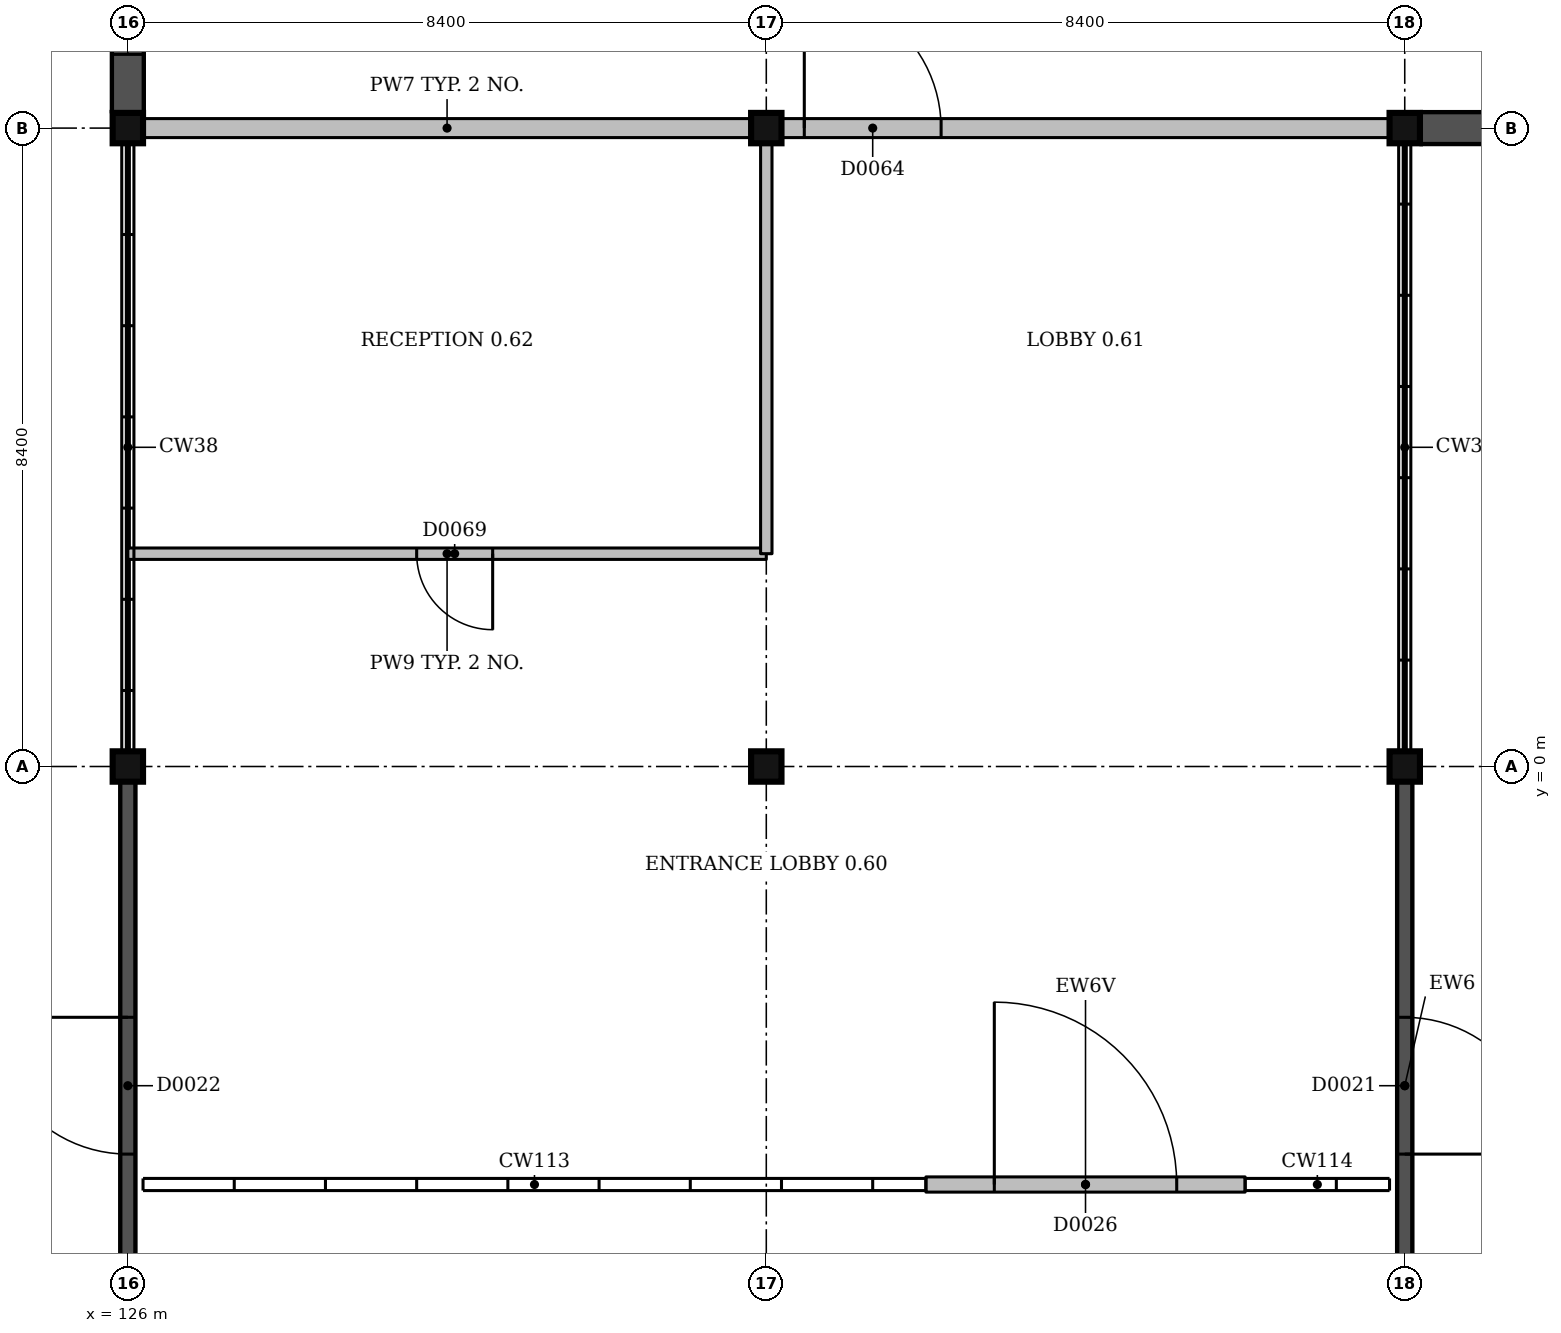
"""IFC4 building model, lengths in metres.
Left out: names, types, materials, properties, quantities, classifications, styles, units other than length and angle.
Written with IfcOpenShell. Run it as: python <this file> out.ifc"""

import sys

from ifc_helpers import new_model, si_unit, direction, frame, frame_2d, origin, origin_2d, place, context, subcontext, project, spatial, rectangle, extrude, element, fill, save


model = new_model("IFC4")
c1 = context("Model", 3, precision=1e-05, world=origin(), true_north=direction((0.0, 1.0)))
c2 = subcontext(c1, "Body", "Model", "MODEL_VIEW")
j1 = project(units=[si_unit("LENGTHUNIT", "METRE"), si_unit("PLANEANGLEUNIT", "RADIAN")], contexts=[c1])
p1 = place(None, origin())
s1 = spatial("IfcSite", under=j1, at=p1, CompositionType="ELEMENT")
p2 = place(p1, origin())
s2 = spatial("IfcBuilding", under=s1, at=p2, CompositionType="ELEMENT")
p3 = place(p2, origin())
s3 = spatial("IfcBuildingStorey", under=s2, at=p3, CompositionType="ELEMENT", Elevation=0.0)
for number, where, z_axis, x_axis in (
    (1, (126.0, 8.4, -1.5), (0.0, 0.0, 1.0), (1.0, 0.0, 0.0)),
    (2, (134.4, 8.4, -1.5), (0.0, 0.0, 1.0), (1.0, 0.0, 0.0)),
    (3, (142.8, 8.4, -1.5), (0.0, 0.0, 1.0), (1.0, 0.0, 0.0)),
    (4, (126.0, 0.0, -1.5), (0.0, 0.0, 1.0), (1.0, 0.0, 0.0)),
    (5, (134.4, 0.0, -1.5), (0.0, 0.0, 1.0), (1.0, 0.0, 0.0)),
    (6, (142.8, 0.0, -1.5), (0.0, 0.0, 1.0), (1.0, 0.0, 0.0)),
):
    element("IfcColumn", number, at=place(p3, frame(where, z_axis=z_axis, x_axis=x_axis)), inside=s3, PredefinedType="COLUMN", context=c2, shape_type="SweptSolid", body=[
        extrude(rectangle(XDim=0.4, YDim=0.4, at=origin_2d()), origin(), (0.0, 0.0, 1.0), 6.0),
    ])
p4 = place(p3, frame((126.0, 12.54, 0.0), z_axis=(0.0, 0.0, 1.0), x_axis=(0.0, -1.0, 0.0)))
e7 = element("IfcWall", 7, at=p4, inside=s3, PredefinedType="SOLIDWALL", context=c2, shape_type="SweptSolid", body=[
    extrude(rectangle(XDim=3.94, YDim=0.42, at=frame_2d((1.97, 0.0))), origin(), (0.0, 0.0, 1.0), 3.75),
])
p5 = place(p4, frame((0.77, 0.0, 0.6)))
e8 = element("IfcOpeningElement", 8, at=p5, cuts=e7, PredefinedType="OPENING", context=c2, shape_type="SweptSolid", body=[
    extrude(rectangle(XDim=2.4, YDim=2.7, at=frame_2d((1.2, 1.35))), frame((0.0, 0.22, 0.0), z_axis=(0.0, -1.0, 0.0), x_axis=(1.0, 0.0, 0.0)), (0.0, 0.0, 1.0), 0.44),
])
p6 = place(p3, frame((143.0, 8.4, 0.0), z_axis=(0.0, 0.0, 1.0), x_axis=(1.0, 0.0, 0.0)))
e9 = element("IfcWall", 9, at=p6, inside=s3, PredefinedType="SOLIDWALL", context=c2, shape_type="SweptSolid", body=[
    extrude(rectangle(XDim=3.94, YDim=0.42, at=frame_2d((1.97, 0.0))), origin(), (0.0, 0.0, 1.0), 3.75),
])
p7 = place(p6, frame((1.07, 0.0, 0.0)))
e10 = element("IfcOpeningElement", 10, at=p7, cuts=e9, PredefinedType="OPENING", context=c2, shape_type="SweptSolid", body=[
    extrude(rectangle(XDim=1.8, YDim=2.1, at=frame_2d((0.9, 1.05))), frame((0.0, 0.22, 0.0), z_axis=(0.0, -1.0, 0.0), x_axis=(1.0, 0.0, 0.0)), (0.0, 0.0, 1.0), 0.44),
])
p8 = place(p3, frame((142.8, -8.2, 0.0), z_axis=(0.0, 0.0, 1.0), x_axis=(0.0, 1.0, 0.0)))
e11 = element("IfcWall", 11, at=p8, inside=s3, PredefinedType="SOLIDWALL", context=c2, shape_type="SweptSolid", body=[
    extrude(rectangle(XDim=8.0, YDim=0.2, at=frame_2d((4.0, 0.0))), origin(), (0.0, 0.0, 1.0), 4.5),
])
p9 = place(p8, frame((3.1, 0.0, 0.0)))
e12 = element("IfcOpeningElement", 12, at=p9, cuts=e11, PredefinedType="OPENING", context=c2, shape_type="SweptSolid", body=[
    extrude(rectangle(XDim=1.8, YDim=2.1, at=frame_2d((0.9, 1.05))), frame((0.0, 0.11, 0.0), z_axis=(0.0, -1.0, 0.0), x_axis=(1.0, 0.0, 0.0)), (0.0, 0.0, 1.0), 0.22),
])
p10 = place(p3, frame((126.0, -0.2, 0.0), z_axis=(0.0, 0.0, 1.0), x_axis=(0.0, -1.0, 0.0)))
e13 = element("IfcWall", 13, at=p10, inside=s3, PredefinedType="SOLIDWALL", context=c2, shape_type="SweptSolid", body=[
    extrude(rectangle(XDim=8.0, YDim=0.2, at=frame_2d((4.0, 0.0))), origin(), (0.0, 0.0, 1.0), 4.5),
])
p11 = place(p10, frame((3.1, 0.0, 0.0)))
e14 = element("IfcOpeningElement", 14, at=p11, cuts=e13, PredefinedType="OPENING", context=c2, shape_type="SweptSolid", body=[
    extrude(rectangle(XDim=1.8, YDim=2.1, at=frame_2d((0.9, 1.05))), frame((0.0, 0.11, 0.0), z_axis=(0.0, -1.0, 0.0), x_axis=(1.0, 0.0, 0.0)), (0.0, 0.0, 1.0), 0.22),
])
p12 = place(p3, frame((136.5, -5.5, 0.0), z_axis=(0.0, 0.0, 1.0), x_axis=(1.0, 0.0, 0.0)))
e15 = element("IfcWall", 15, at=p12, inside=s3, PredefinedType="SOLIDWALL", context=c2, shape_type="SweptSolid", body=[
    extrude(rectangle(XDim=4.2, YDim=0.2, at=frame_2d((2.1, 0.0))), origin(), (0.0, 0.0, 1.0), 4.5),
])
p13 = place(p12, frame((0.9, 0.0, 0.0)))
e16 = element("IfcOpeningElement", 16, at=p13, cuts=e15, PredefinedType="OPENING", context=c2, shape_type="SweptSolid", body=[
    extrude(rectangle(XDim=2.4, YDim=2.7, at=frame_2d((1.2, 1.35))), frame((0.0, 0.11, 0.0), z_axis=(0.0, -1.0, 0.0), x_axis=(1.0, 0.0, 0.0)), (0.0, 0.0, 1.0), 0.22),
])
p14 = place(p3, frame((126.0, 2.8, 0.0), z_axis=(0.0, 0.0, 1.0), x_axis=(1.0, 0.0, 0.0)))
e17 = element("IfcWall", 17, at=p14, inside=s3, PredefinedType="PARTITIONING", context=c2, shape_type="SweptSolid", body=[
    extrude(rectangle(XDim=8.4, YDim=0.15, at=frame_2d((4.2, 0.0))), origin(), (0.0, 0.0, 1.0), 2.37),
])
p15 = place(p14, frame((3.8, 0.0, 0.0)))
e18 = element("IfcOpeningElement", 18, at=p15, cuts=e17, PredefinedType="OPENING", context=c2, shape_type="SweptSolid", body=[
    extrude(rectangle(XDim=1.0, YDim=2.1, at=frame_2d((0.5, 1.05))), frame((0.0, 0.085, 0.0), z_axis=(0.0, -1.0, 0.0), x_axis=(1.0, 0.0, 0.0)), (0.0, 0.0, 1.0), 0.17),
])
p16 = place(p3, frame((126.2, 8.4, 0.0), z_axis=(0.0, 0.0, 1.0), x_axis=(1.0, 0.0, 0.0)))
e19 = element("IfcWall", 19, at=p16, inside=s3, PredefinedType="SOLIDWALL", context=c2, shape_type="SweptSolid", body=[
    extrude(rectangle(XDim=8.0, YDim=0.25, at=frame_2d((4.0, 0.0))), origin(), (0.0, 0.0, 1.0), 3.75),
])
p17 = place(p3, frame((134.6, 8.4, 0.0), z_axis=(0.0, 0.0, 1.0), x_axis=(1.0, 0.0, 0.0)))
e20 = element("IfcWall", 20, at=p17, inside=s3, PredefinedType="SOLIDWALL", context=c2, shape_type="SweptSolid", body=[
    extrude(rectangle(XDim=8.0, YDim=0.25, at=frame_2d((4.0, 0.0))), origin(), (0.0, 0.0, 1.0), 3.75),
])
p18 = place(p17, frame((0.3, 0.0, 0.0)))
e21 = element("IfcOpeningElement", 21, at=p18, cuts=e20, PredefinedType="OPENING", context=c2, shape_type="SweptSolid", body=[
    extrude(rectangle(XDim=1.8, YDim=2.1, at=frame_2d((0.9, 1.05))), frame((0.0, 0.135, 0.0), z_axis=(0.0, -1.0, 0.0), x_axis=(1.0, 0.0, 0.0)), (0.0, 0.0, 1.0), 0.27),
])
p19 = place(p3, frame((134.4, 2.8, 0.0), z_axis=(0.0, 0.0, 1.0), x_axis=(0.0, 1.0, 0.0)))
e22 = element("IfcWall", 22, at=p19, inside=s3, PredefinedType="PARTITIONING", context=c2, shape_type="SweptSolid", body=[
    extrude(rectangle(XDim=5.4, YDim=0.15, at=frame_2d((2.7, 0.0))), origin(), (0.0, 0.0, 1.0), 4.15),
])
p20 = place(p5, origin())
e23 = element("IfcWindow", 23, at=p20, inside=s3, PartitioningType="SINGLE_PANEL", PredefinedType="WINDOW", context=c2, shape_type="SweptSolid", body=[
    extrude(rectangle(XDim=2.4, YDim=2.7, at=frame_2d((1.2, 1.35))), frame((0.0, 0.15, 0.0), z_axis=(0.0, -1.0, 0.0), x_axis=(1.0, 0.0, 0.0)), (0.0, 0.0, 1.0), 0.06),
])
fill(e8, e23)
p21 = place(p9, origin())
e24 = element("IfcDoor", 24, at=p21, inside=s3, OperationType="SINGLE_SWING_LEFT", PredefinedType="DOOR", context=c2, shape_type="SweptSolid", body=[
    extrude(rectangle(XDim=1.8, YDim=2.1, at=frame_2d((0.9, 1.05))), frame((0.0, 0.025, 0.0), z_axis=(0.0, -1.0, 0.0), x_axis=(1.0, 0.0, 0.0)), (0.0, 0.0, 1.0), 0.05),
])
fill(e12, e24)
p22 = place(p11, origin())
e25 = element("IfcDoor", 25, at=p22, inside=s3, OperationType="SINGLE_SWING_LEFT", PredefinedType="DOOR", context=c2, shape_type="SweptSolid", body=[
    extrude(rectangle(XDim=1.8, YDim=2.1, at=frame_2d((0.9, 1.05))), frame((0.0, 0.025, 0.0), z_axis=(0.0, -1.0, 0.0), x_axis=(1.0, 0.0, 0.0)), (0.0, 0.0, 1.0), 0.05),
])
fill(e14, e25)
p23 = place(p13, origin())
e26 = element("IfcDoor", 26, at=p23, inside=s3, OperationType="SINGLE_SWING_LEFT", PredefinedType="DOOR", context=c2, shape_type="SweptSolid", body=[
    extrude(rectangle(XDim=2.4, YDim=2.7, at=frame_2d((1.2, 1.35))), frame((0.0, 0.025, 0.0), z_axis=(0.0, -1.0, 0.0), x_axis=(1.0, 0.0, 0.0)), (0.0, 0.0, 1.0), 0.05),
])
fill(e16, e26)
p24 = place(p18, origin())
e27 = element("IfcDoor", 27, at=p24, inside=s3, OperationType="DOUBLE_DOOR_SINGLE_SWING", PredefinedType="DOOR", context=c2, shape_type="SweptSolid", body=[
    extrude(rectangle(XDim=1.8, YDim=2.1, at=frame_2d((0.9, 1.05))), frame((0.0, 0.025, 0.0), z_axis=(0.0, -1.0, 0.0), x_axis=(1.0, 0.0, 0.0)), (0.0, 0.0, 1.0), 0.05),
])
fill(e21, e27)
p25 = place(p15, origin())
e28 = element("IfcDoor", 28, at=p25, inside=s3, OperationType="SINGLE_SWING_RIGHT", PredefinedType="DOOR", context=c2, shape_type="SweptSolid", body=[
    extrude(rectangle(XDim=1.0, YDim=2.1, at=frame_2d((0.5, 1.05))), frame((0.0, 0.025, 0.0), z_axis=(0.0, -1.0, 0.0), x_axis=(1.0, 0.0, 0.0)), (0.0, 0.0, 1.0), 0.05),
])
fill(e18, e28)
save(model, sys.argv[1])
